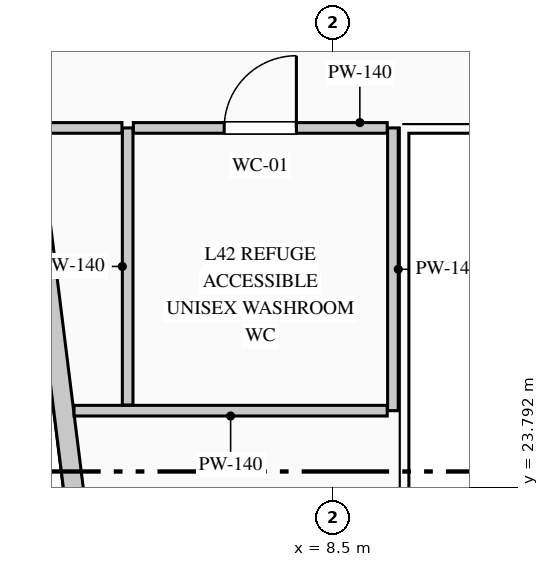
"""IFC4 building model, lengths in metres.
Left out: names, types, materials, properties, quantities, classifications, styles, units other than length and angle.
Written with IfcOpenShell. Run it as: python <this file> out.ifc"""

import sys

from ifc_helpers import new_model, si_unit, direction, frame, frame_2d, origin, place, context, subcontext, project, spatial, rectangle, extrude, element, fill, save


model = new_model("IFC4")
c1 = context("Model", 3, precision=1e-05, world=origin(), true_north=direction((0.0, 1.0)))
c2 = subcontext(c1, "Body", "Model", "MODEL_VIEW")
j1 = project(units=[si_unit("LENGTHUNIT", "METRE"), si_unit("PLANEANGLEUNIT", "RADIAN")], contexts=[c1])
p1 = place(None, origin())
s1 = spatial("IfcSite", under=j1, at=p1, CompositionType="ELEMENT")
p2 = place(p1, origin())
s2 = spatial("IfcBuilding", under=s1, at=p2, CompositionType="ELEMENT")
p3 = place(p2, frame((0.0, 0.0, 178.55)))
s3 = spatial("IfcBuildingStorey", under=s2, at=p3, CompositionType="ELEMENT", Elevation=178.55)
p4 = place(p3, frame((7.469, 4.63, 0.0), z_axis=(0.0, 0.0, 1.0), x_axis=(-0.123515300309, 0.992342667928, 0.0)))
e1 = element("IfcWall", 1, at=p4, inside=s3, PredefinedType="STANDARD", context=c2, shape_type="SweptSolid", body=[
    extrude(rectangle(XDim=37.024, YDim=0.26, at=frame_2d((18.512, 0.0))), origin(), (0.0, 0.0, 1.0), 4.95),
])
p5 = place(p3, frame((9.29, 28.52, 0.0), z_axis=(0.0, 0.0, 1.0), x_axis=(0.0, -1.0, 0.0)))
e2 = element("IfcWall", 2, at=p5, inside=s3, PredefinedType="PARTITIONING", context=c2, shape_type="SweptSolid", body=[
    extrude(rectangle(XDim=3.72, YDim=0.14, at=frame_2d((1.86, 0.0))), origin(), (0.0, 0.0, 1.0), 4.575),
])
p6 = place(p3, frame((9.215, 24.8, 0.0), z_axis=(0.0, 0.0, 1.0), x_axis=(-1.0, 0.0, 0.0)))
e3 = element("IfcWall", 3, at=p6, inside=s3, PredefinedType="PARTITIONING", context=c2, shape_type="SweptSolid", body=[
    extrude(rectangle(XDim=4.121, YDim=0.14, at=frame_2d((2.06, 0.0))), origin(), (0.0, 0.0, 1.0), 4.95),
])
p7 = place(p3, frame((5.8, 24.875, 0.0), z_axis=(0.0, 0.0, 1.0), x_axis=(0.0, 1.0, 0.0)))
e4 = element("IfcWall", 4, at=p7, inside=s3, PredefinedType="PARTITIONING", context=c2, shape_type="SweptSolid", body=[
    extrude(rectangle(XDim=3.645, YDim=0.14, at=frame_2d((1.823, 0.0))), origin(), (0.0, 0.0, 1.0), 4.95),
])
p8 = place(p3, frame((4.632, 28.52, 0.0), z_axis=(0.0, 0.0, 1.0), x_axis=(1.0, 0.0, 0.0)))
e5 = element("IfcWall", 5, at=p8, inside=s3, PredefinedType="PARTITIONING", context=c2, shape_type="SweptSolid", body=[
    extrude(rectangle(XDim=1.094, YDim=0.14, at=frame_2d((0.547, 0.0))), origin(), (0.0, 0.0, 1.0), 4.95),
])
p9 = place(p3, frame((5.875, 28.52, 0.0), z_axis=(0.0, 0.0, 1.0), x_axis=(1.0, 0.0, 0.0)))
e6 = element("IfcWall", 6, at=p9, inside=s3, PredefinedType="PARTITIONING", context=c2, shape_type="SweptSolid", body=[
    extrude(rectangle(XDim=3.34, YDim=0.14, at=frame_2d((1.67, 0.0))), origin(), (0.0, 0.0, 1.0), 4.95),
])
p10 = place(p9, frame((1.195, 0.0, 0.0)))
e7 = element("IfcOpeningElement", 7, at=p10, cuts=e6, PredefinedType="OPENING", context=c2, shape_type="SweptSolid", body=[
    extrude(rectangle(XDim=0.95, YDim=2.15, at=frame_2d((0.475, 1.075))), frame((0.0, 0.08, 0.0), z_axis=(0.0, -1.0, 0.0), x_axis=(1.0, 0.0, 0.0)), (0.0, 0.0, 1.0), 0.16),
])
p11 = place(p10, origin())
e8 = element("IfcDoor", 8, at=p11, inside=s3, OperationType="SINGLE_SWING_RIGHT", PredefinedType="DOOR", context=c2, shape_type="SweptSolid", body=[
    extrude(rectangle(XDim=0.95, YDim=2.15, at=frame_2d((0.475, 1.075))), frame((0.0, 0.025, 0.0), z_axis=(0.0, -1.0, 0.0), x_axis=(1.0, 0.0, 0.0)), (0.0, 0.0, 1.0), 0.05),
])
fill(e7, e8)
save(model, sys.argv[1])
